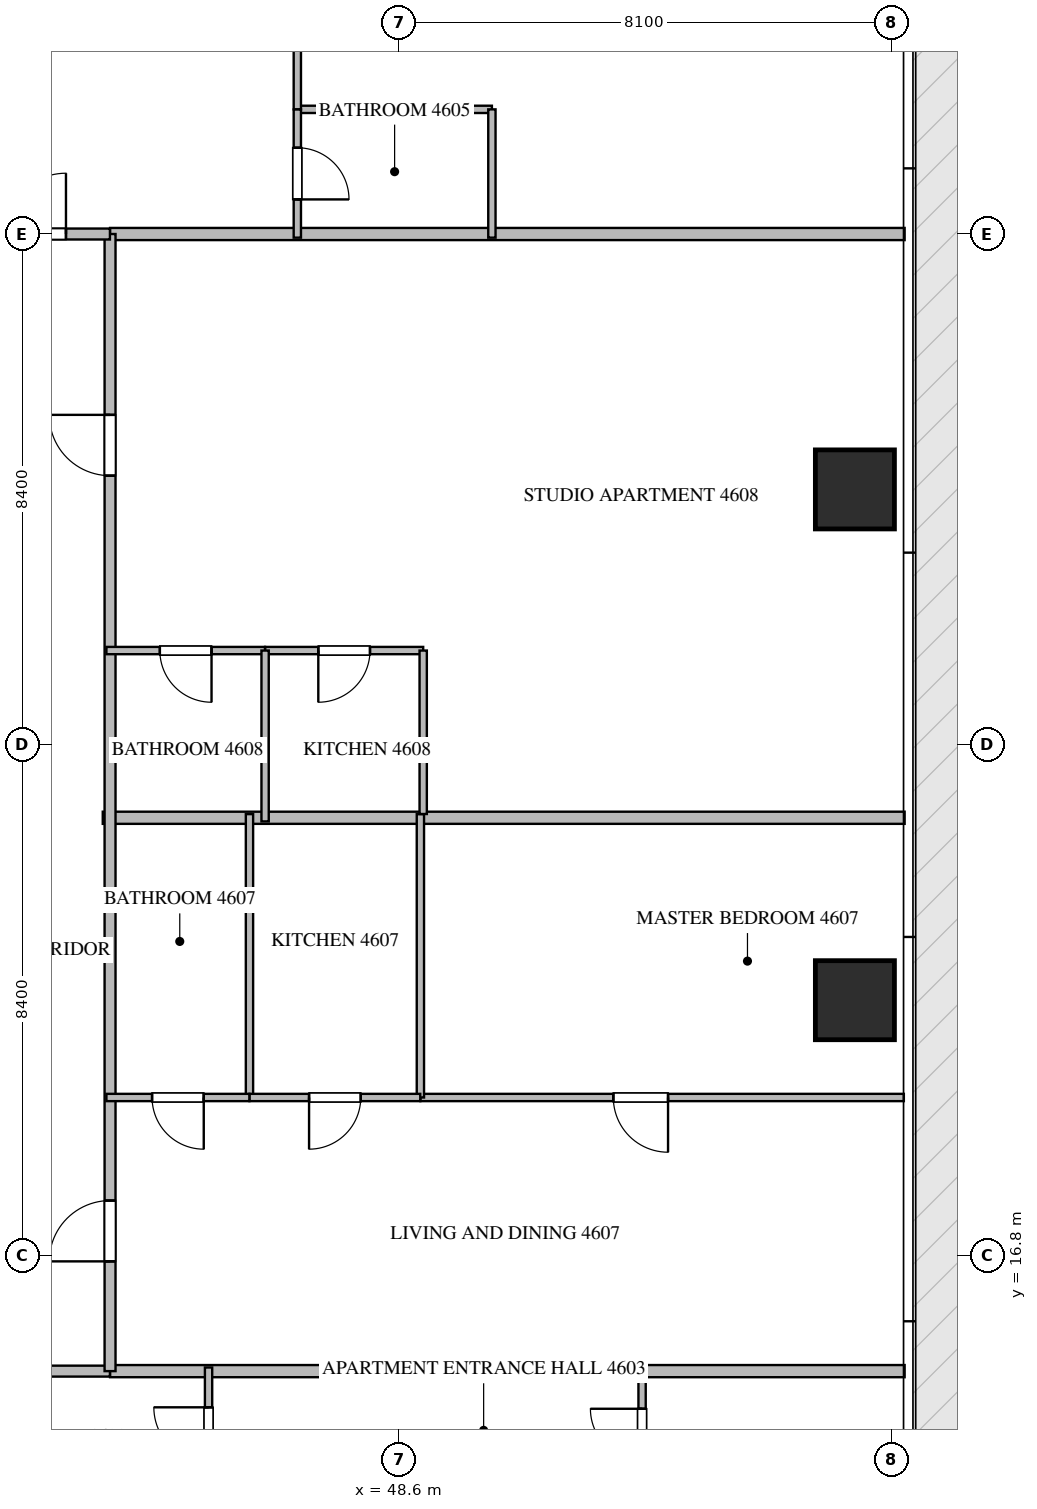
"""IFC4 building model, lengths in metres.
Left out: names, types, materials, properties, quantities, classifications, styles, units other than length and angle.
Written with IfcOpenShell. Run it as: python <this file> out.ifc"""

import sys

from ifc_helpers import new_model, si_unit, direction, frame, frame_2d, origin, origin_2d, place, context, subcontext, project, spatial, rectangle, extrude, source, transform, mapped, element, fill, save


model = new_model("IFC4")
c1 = context("Model", 3, precision=1e-05, world=origin(), true_north=direction((0.0, 1.0)))
c2 = subcontext(c1, "Body", "Model", "MODEL_VIEW")
j1 = project(units=[si_unit("LENGTHUNIT", "METRE"), si_unit("PLANEANGLEUNIT", "RADIAN")], contexts=[c1])
p1 = place(None, origin())
s1 = spatial("IfcSite", under=j1, at=p1, CompositionType="ELEMENT")
p2 = place(p1, origin())
s2 = spatial("IfcBuilding", under=s1, at=p2, CompositionType="ELEMENT")
p3 = place(p2, frame((0.0, 0.0, 183.9)))
s3 = spatial("IfcBuildingStorey", under=s2, at=p3, CompositionType="ELEMENT", Elevation=183.9)
m1 = source(origin(), c2, "Body", "SweptSolid", [
    extrude(rectangle(XDim=1.3, YDim=1.3, at=origin_2d()), origin(), (0.0, 0.0, 1.0), 3.75),
])
for number, where, z_axis, x_axis in (
    (1, (56.1, 21.0, -0.26), (0.0, 0.0, 1.0), (1.0, 0.0, 0.0)),
    (2, (56.1, 29.4, -0.26), (0.0, 0.0, 1.0), (1.0, 0.0, 0.0)),
):
    element("IfcColumn", number, at=place(p3, frame(where, z_axis=z_axis, x_axis=x_axis)), inside=s3, PredefinedType="COLUMN", context=c2, shape_type="MappedRepresentation", body=[
        mapped(m1, transform((0.0, 0.0, 0.0), scale=1.0)),
    ])
p4 = place(p3, frame((43.73, 24.0, 0.0), z_axis=(0.0, 0.0, 1.0), x_axis=(1.0, 0.0, 0.0)))
e3 = element("IfcWall", 3, at=p4, inside=s3, PredefinedType="PARTITIONING", context=c2, shape_type="SweptSolid", body=[
    extrude(rectangle(XDim=13.188, YDim=0.2, at=frame_2d((6.594, 0.0))), origin(), (0.0, 0.0, 1.0), 3.49),
])
for number, where, z_axis, x_axis in (
    (4, (43.85, 14.9, 0.0), (0.0, 0.0, 1.0), (1.0, 0.0, 0.0)),
    (5, (43.85, 33.6, 0.0), (0.0, 0.0, 1.0), (1.0, 0.0, 0.0)),
):
    element("IfcWall", number, at=place(p3, frame(where, z_axis=z_axis, x_axis=x_axis)), inside=s3, PredefinedType="PARTITIONING", context=c2, shape_type="SweptSolid", body=[
        extrude(rectangle(XDim=13.068, YDim=0.2, at=frame_2d((6.534, 0.0))), origin(), (0.0, 0.0, 1.0), 3.49),
    ])
p5 = place(p3, frame((20.952, 14.9, 0.0), z_axis=(0.0, 0.0, 1.0), x_axis=(1.0, 0.0, 0.0)))
e6 = element("IfcWall", 6, at=p5, inside=s3, PredefinedType="PARTITIONING", context=c2, shape_type="SweptSolid", body=[
    extrude(rectangle(XDim=22.896, YDim=0.18, at=frame_2d((11.448, 0.0))), origin(), (0.0, 0.0, 1.0), 3.49),
])
p6 = place(p5, frame((2.781, 0.0, 0.0)))
e7 = element("IfcOpeningElement", 7, at=p6, cuts=e6, PredefinedType="OPENING", context=c2, shape_type="SweptSolid", body=[
    extrude(rectangle(XDim=1.0, YDim=2.15, at=frame_2d((0.5, 1.075))), frame((0.0, 0.1, 0.0), z_axis=(0.0, -1.0, 0.0), x_axis=(1.0, 0.0, 0.0)), (0.0, 0.0, 1.0), 0.2),
])
p7 = place(p5, frame((14.736, 0.0, 0.0)))
e8 = element("IfcOpeningElement", 8, at=p7, cuts=e6, PredefinedType="OPENING", context=c2, shape_type="SweptSolid", body=[
    extrude(rectangle(XDim=1.0, YDim=2.15, at=frame_2d((0.5, 1.075))), frame((0.0, 0.1, 0.0), z_axis=(0.0, -1.0, 0.0), x_axis=(1.0, 0.0, 0.0)), (0.0, 0.0, 1.0), 0.2),
])
p8 = place(p5, frame((19.115, 0.0, 0.0)))
e9 = element("IfcOpeningElement", 9, at=p8, cuts=e6, PredefinedType="OPENING", context=c2, shape_type="SweptSolid", body=[
    extrude(rectangle(XDim=1.0, YDim=2.15, at=frame_2d((0.5, 1.075))), frame((0.0, 0.1, 0.0), z_axis=(0.0, -1.0, 0.0), x_axis=(1.0, 0.0, 0.0)), (0.0, 0.0, 1.0), 0.2),
])
p9 = place(p3, frame((43.85, 14.9, 0.0), z_axis=(0.0, 0.0, 1.0), x_axis=(0.0, 1.0, 0.0)))
e10 = element("IfcWall", 10, at=p9, inside=s3, PredefinedType="PARTITIONING", context=c2, shape_type="SweptSolid", body=[
    extrude(rectangle(XDim=18.7, YDim=0.18, at=frame_2d((9.35, 0.0))), origin(), (0.0, 0.0, 1.0), 3.49),
])
p10 = place(p9, frame((1.805, 0.0, 0.0)))
e11 = element("IfcOpeningElement", 11, at=p10, cuts=e10, PredefinedType="OPENING", context=c2, shape_type="SweptSolid", body=[
    extrude(rectangle(XDim=1.0, YDim=2.15, at=frame_2d((0.5, 1.075))), frame((0.0, 0.1, 0.0), z_axis=(0.0, -1.0, 0.0), x_axis=(1.0, 0.0, 0.0)), (0.0, 0.0, 1.0), 0.2),
])
p11 = place(p9, frame((14.726, 0.0, 0.0)))
e12 = element("IfcOpeningElement", 12, at=p11, cuts=e10, PredefinedType="OPENING", context=c2, shape_type="SweptSolid", body=[
    extrude(rectangle(XDim=1.0, YDim=2.15, at=frame_2d((0.5, 1.075))), frame((0.0, 0.1, 0.0), z_axis=(0.0, -1.0, 0.0), x_axis=(1.0, 0.0, 0.0)), (0.0, 0.0, 1.0), 0.2),
])
p12 = place(p3, frame((41.402, 33.6, 0.0), z_axis=(0.0, 0.0, 1.0), x_axis=(1.0, 0.0, 0.0)))
e13 = element("IfcWall", 13, at=p12, inside=s3, PredefinedType="PARTITIONING", context=c2, shape_type="SweptSolid", body=[
    extrude(rectangle(XDim=2.446, YDim=0.18, at=frame_2d((1.223, 0.0))), origin(), (0.0, 0.0, 1.0), 3.49),
])
p13 = place(p12, frame((0.723, 0.0, 0.0)))
e14 = element("IfcOpeningElement", 14, at=p13, cuts=e13, PredefinedType="OPENING", context=c2, shape_type="SweptSolid", body=[
    extrude(rectangle(XDim=1.0, YDim=2.15, at=frame_2d((0.5, 1.075))), frame((0.0, 0.1, 0.0), z_axis=(0.0, -1.0, 0.0), x_axis=(1.0, 0.0, 0.0)), (0.0, 0.0, 1.0), 0.2),
])
p14 = place(p3, frame((45.47, 12.75, 0.0), z_axis=(0.0, 0.0, 1.0), x_axis=(0.0, 1.0, 0.0)))
e15 = element("IfcWall", 15, at=p14, inside=s3, PredefinedType="PARTITIONING", context=c2, shape_type="SweptSolid", body=[
    extrude(rectangle(XDim=2.21, YDim=0.12, at=frame_2d((1.105, 0.0))), origin(), (0.0, 0.0, 1.0), 3.49),
])
p15 = place(p14, frame((0.655, 0.0, 0.0)))
e16 = element("IfcOpeningElement", 16, at=p15, cuts=e15, PredefinedType="OPENING", context=c2, shape_type="SweptSolid", body=[
    extrude(rectangle(XDim=0.9, YDim=2.1, at=frame_2d((0.45, 1.05))), frame((0.0, 0.07, 0.0), z_axis=(0.0, -1.0, 0.0), x_axis=(1.0, 0.0, 0.0)), (0.0, 0.0, 1.0), 0.14),
])
p16 = place(p3, frame((52.6, 12.752, 0.0), z_axis=(0.0, 0.0, 1.0), x_axis=(0.0, 1.0, 0.0)))
e17 = element("IfcWall", 17, at=p16, inside=s3, PredefinedType="PARTITIONING", context=c2, shape_type="SweptSolid", body=[
    extrude(rectangle(XDim=2.208, YDim=0.12, at=frame_2d((1.104, 0.0))), origin(), (0.0, 0.0, 1.0), 3.49),
])
p17 = place(p16, frame((0.679, 0.0, 0.0)))
e18 = element("IfcOpeningElement", 18, at=p17, cuts=e17, PredefinedType="OPENING", context=c2, shape_type="SweptSolid", body=[
    extrude(rectangle(XDim=0.85, YDim=2.1, at=frame_2d((0.425, 1.05))), frame((0.0, 0.07, 0.0), z_axis=(0.0, -1.0, 0.0), x_axis=(1.0, 0.0, 0.0)), (0.0, 0.0, 1.0), 0.14),
])
p18 = place(p3, frame((46.93, 35.65, 0.0), z_axis=(0.0, 0.0, 1.0), x_axis=(1.0, 0.0, 0.0)))
e19 = element("IfcWall", 19, at=p18, inside=s3, PredefinedType="PARTITIONING", context=c2, shape_type="SweptSolid", body=[
    extrude(rectangle(XDim=3.2, YDim=0.12, at=frame_2d((1.6, 0.0))), origin(), (0.0, 0.0, 1.0), 3.49),
])
p19 = place(p3, frame((50.13, 35.65, 0.0), z_axis=(0.0, 0.0, 1.0), x_axis=(0.0, -1.0, 0.0)))
e20 = element("IfcWall", 20, at=p19, inside=s3, PredefinedType="PARTITIONING", context=c2, shape_type="SweptSolid", body=[
    extrude(rectangle(XDim=2.11, YDim=0.12, at=frame_2d((1.055, 0.0))), origin(), (0.0, 0.0, 1.0), 3.49),
])
p20 = place(p3, frame((46.93, 41.073, 0.0), z_axis=(0.0, 0.0, 1.0), x_axis=(0.0, -1.0, 0.0)))
e21 = element("IfcWall", 21, at=p20, inside=s3, PredefinedType="PARTITIONING", context=c2, shape_type="SweptSolid", body=[
    extrude(rectangle(XDim=5.423, YDim=0.12, at=frame_2d((2.711, 0.0))), origin(), (0.0, 0.0, 1.0), 3.49),
])
p21 = place(p20, frame((2.287, 0.0, 0.0)))
e22 = element("IfcOpeningElement", 22, at=p21, cuts=e21, PredefinedType="OPENING", context=c2, shape_type="SweptSolid", body=[
    extrude(rectangle(XDim=0.85, YDim=2.1, at=frame_2d((0.425, 1.05))), frame((0.0, 0.07, 0.0), z_axis=(0.0, -1.0, 0.0), x_axis=(1.0, 0.0, 0.0)), (0.0, 0.0, 1.0), 0.14),
])
p22 = place(p3, frame((46.93, 35.648, 0.0), z_axis=(0.0, 0.0, 1.0), x_axis=(0.0, -1.0, 0.0)))
e23 = element("IfcWall", 23, at=p22, inside=s3, PredefinedType="PARTITIONING", context=c2, shape_type="SweptSolid", body=[
    extrude(rectangle(XDim=2.108, YDim=0.12, at=frame_2d((1.054, 0.0))), origin(), (0.0, 0.0, 1.0), 3.49),
])
p23 = place(p22, frame((0.629, 0.0, 0.0)))
e24 = element("IfcOpeningElement", 24, at=p23, cuts=e23, PredefinedType="OPENING", context=c2, shape_type="SweptSolid", body=[
    extrude(rectangle(XDim=0.85, YDim=2.1, at=frame_2d((0.425, 1.05))), frame((0.0, 0.07, 0.0), z_axis=(0.0, -1.0, 0.0), x_axis=(1.0, 0.0, 0.0)), (0.0, 0.0, 1.0), 0.14),
])
p24 = place(p3, frame((56.905, 19.4, 0.0), z_axis=(0.0, 0.0, 1.0), x_axis=(-1.0, 0.0, 0.0)))
e25 = element("IfcWall", 25, at=p24, inside=s3, PredefinedType="PARTITIONING", context=c2, shape_type="SweptSolid", body=[
    extrude(rectangle(XDim=7.951, YDim=0.12, at=frame_2d((3.976, 0.0))), origin(), (0.0, 0.0, 1.0), 3.49),
])
p25 = place(p24, frame((3.878, 0.0, 0.0)))
e26 = element("IfcOpeningElement", 26, at=p25, cuts=e25, PredefinedType="OPENING", context=c2, shape_type="SweptSolid", body=[
    extrude(rectangle(XDim=0.9, YDim=2.1, at=frame_2d((0.45, 1.05))), frame((0.0, 0.07, 0.0), z_axis=(0.0, -1.0, 0.0), x_axis=(1.0, 0.0, 0.0)), (0.0, 0.0, 1.0), 0.14),
])
for number, where, z_axis, x_axis in (
    (27, (48.954, 19.4, 0.0), (0.0, 0.0, 1.0), (0.0, 1.0, 0.0)),
    (28, (46.143, 19.4, 0.0), (0.0, 0.0, 1.0), (0.0, 1.0, 0.0)),
):
    element("IfcWall", number, at=place(p3, frame(where, z_axis=z_axis, x_axis=x_axis)), inside=s3, PredefinedType="PARTITIONING", context=c2, shape_type="SweptSolid", body=[
        extrude(rectangle(XDim=4.66, YDim=0.12, at=frame_2d((2.33, 0.0))), origin(), (0.0, 0.0, 1.0), 3.49),
    ])
p26 = place(p3, frame((48.952, 19.4, 0.0), z_axis=(0.0, 0.0, 1.0), x_axis=(-1.0, 0.0, 0.0)))
e29 = element("IfcWall", 29, at=p26, inside=s3, PredefinedType="PARTITIONING", context=c2, shape_type="SweptSolid", body=[
    extrude(rectangle(XDim=2.809, YDim=0.12, at=frame_2d((1.404, 0.0))), origin(), (0.0, 0.0, 1.0), 3.49),
])
p27 = place(p26, frame((0.979, 0.0, 0.0)))
e30 = element("IfcOpeningElement", 30, at=p27, cuts=e29, PredefinedType="OPENING", context=c2, shape_type="SweptSolid", body=[
    extrude(rectangle(XDim=0.85, YDim=2.1, at=frame_2d((0.425, 1.05))), frame((0.0, 0.07, 0.0), z_axis=(0.0, -1.0, 0.0), x_axis=(1.0, 0.0, 0.0)), (0.0, 0.0, 1.0), 0.14),
])
p28 = place(p3, frame((46.141, 19.4, 0.0), z_axis=(0.0, 0.0, 1.0), x_axis=(-1.0, 0.0, 0.0)))
e31 = element("IfcWall", 31, at=p28, inside=s3, PredefinedType="PARTITIONING", context=c2, shape_type="SweptSolid", body=[
    extrude(rectangle(XDim=2.351, YDim=0.12, at=frame_2d((1.176, 0.0))), origin(), (0.0, 0.0, 1.0), 3.49),
])
p29 = place(p28, frame((0.75, 0.0, 0.0)))
e32 = element("IfcOpeningElement", 32, at=p29, cuts=e31, PredefinedType="OPENING", context=c2, shape_type="SweptSolid", body=[
    extrude(rectangle(XDim=0.85, YDim=2.1, at=frame_2d((0.425, 1.05))), frame((0.0, 0.07, 0.0), z_axis=(0.0, -1.0, 0.0), x_axis=(1.0, 0.0, 0.0)), (0.0, 0.0, 1.0), 0.14),
])
p30 = place(p3, frame((49.0, 26.75, 0.0), z_axis=(0.0, 0.0, 1.0), x_axis=(-1.0, 0.0, 0.0)))
e33 = element("IfcWall", 33, at=p30, inside=s3, PredefinedType="PARTITIONING", context=c2, shape_type="SweptSolid", body=[
    extrude(rectangle(XDim=2.6, YDim=0.12, at=frame_2d((1.3, 0.0))), origin(), (0.0, 0.0, 1.0), 3.49),
])
p31 = place(p30, frame((0.875, 0.0, 0.0)))
e34 = element("IfcOpeningElement", 34, at=p31, cuts=e33, PredefinedType="OPENING", context=c2, shape_type="SweptSolid", body=[
    extrude(rectangle(XDim=0.85, YDim=2.1, at=frame_2d((0.425, 1.05))), frame((0.0, 0.07, 0.0), z_axis=(0.0, -1.0, 0.0), x_axis=(1.0, 0.0, 0.0)), (0.0, 0.0, 1.0), 0.14),
])
p32 = place(p3, frame((46.398, 26.75, 0.0), z_axis=(0.0, 0.0, 1.0), x_axis=(-1.0, 0.0, 0.0)))
e35 = element("IfcWall", 35, at=p32, inside=s3, PredefinedType="PARTITIONING", context=c2, shape_type="SweptSolid", body=[
    extrude(rectangle(XDim=2.608, YDim=0.12, at=frame_2d((1.304, 0.0))), origin(), (0.0, 0.0, 1.0), 3.49),
])
p33 = place(p32, frame((0.879, 0.0, 0.0)))
e36 = element("IfcOpeningElement", 36, at=p33, cuts=e35, PredefinedType="OPENING", context=c2, shape_type="SweptSolid", body=[
    extrude(rectangle(XDim=0.85, YDim=2.1, at=frame_2d((0.425, 1.05))), frame((0.0, 0.07, 0.0), z_axis=(0.0, -1.0, 0.0), x_axis=(1.0, 0.0, 0.0)), (0.0, 0.0, 1.0), 0.14),
])
p34 = place(p3, frame((46.4, 23.94, 0.0), z_axis=(0.0, 0.0, 1.0), x_axis=(0.0, 1.0, 0.0)))
e37 = element("IfcWall", 37, at=p34, inside=s3, PredefinedType="PARTITIONING", context=c2, shape_type="SweptSolid", body=[
    extrude(rectangle(XDim=2.81, YDim=0.12, at=frame_2d((1.405, 0.0))), origin(), (0.0, 0.0, 1.0), 3.49),
])
p35 = place(p3, frame((49.0, 24.062, 0.0), z_axis=(0.0, 0.0, 1.0), x_axis=(0.0, 1.0, 0.0)))
e38 = element("IfcWall", 38, at=p35, inside=s3, PredefinedType="PARTITIONING", context=c2, shape_type="SweptSolid", body=[
    extrude(rectangle(XDim=2.688, YDim=0.12, at=frame_2d((1.344, 0.0))), origin(), (0.0, 0.0, 1.0), 3.49),
])
m2 = source(origin(), c2, "Body", "SweptSolid", [
    extrude(rectangle(XDim=1.0, YDim=2.15, at=frame_2d((0.5, 1.075))), frame((0.0, 0.025, 0.0), z_axis=(0.0, -1.0, 0.0), x_axis=(1.0, 0.0, 0.0)), (0.0, 0.0, 1.0), 0.05),
])
p36 = place(p10, origin())
e39 = element("IfcDoor", 39, at=p36, inside=s3, OperationType="SINGLE_SWING_LEFT", PredefinedType="DOOR", context=c2, shape_type="MappedRepresentation", body=[
    mapped(m2, transform((0.0, 0.0, 0.0), scale=1.0)),
])
fill(e11, e39)
p37 = place(p11, origin())
e40 = element("IfcDoor", 40, at=p37, inside=s3, OperationType="SINGLE_SWING_RIGHT", PredefinedType="DOOR", context=c2, shape_type="MappedRepresentation", body=[
    mapped(m2, transform((0.0, 0.0, 0.0), scale=1.0)),
])
fill(e12, e40)
p38 = place(p13, origin())
e41 = element("IfcDoor", 41, at=p38, inside=s3, OperationType="SINGLE_SWING_RIGHT", PredefinedType="DOOR", context=c2, shape_type="MappedRepresentation", body=[
    mapped(m2, transform((0.0, 0.0, 0.0), scale=1.0)),
])
fill(e14, e41)
m3 = source(origin(), c2, "Body", "SweptSolid", [
    extrude(rectangle(XDim=0.9, YDim=2.1, at=frame_2d((0.45, 1.05))), frame((0.0, 0.025, 0.0), z_axis=(0.0, -1.0, 0.0), x_axis=(1.0, 0.0, 0.0)), (0.0, 0.0, 1.0), 0.05),
])
p39 = place(p15, origin())
e42 = element("IfcDoor", 42, at=p39, inside=s3, OperationType="SINGLE_SWING_RIGHT", PredefinedType="DOOR", context=c2, shape_type="MappedRepresentation", body=[
    mapped(m3, transform((0.0, 0.0, 0.0), scale=1.0)),
])
fill(e16, e42)
m4 = source(origin(), c2, "Body", "SweptSolid", [
    extrude(rectangle(XDim=0.85, YDim=2.1, at=frame_2d((0.425, 1.05))), frame((0.0, 0.025, 0.0), z_axis=(0.0, -1.0, 0.0), x_axis=(1.0, 0.0, 0.0)), (0.0, 0.0, 1.0), 0.05),
])
p40 = place(p17, origin())
e43 = element("IfcDoor", 43, at=p40, inside=s3, OperationType="SINGLE_SWING_RIGHT", PredefinedType="DOOR", context=c2, shape_type="MappedRepresentation", body=[
    mapped(m4, transform((0.0, 0.0, 0.0), scale=1.0)),
])
fill(e18, e43)
p41 = place(p23, origin())
e44 = element("IfcDoor", 44, at=p41, inside=s3, OperationType="SINGLE_SWING_RIGHT", PredefinedType="DOOR", context=c2, shape_type="MappedRepresentation", body=[
    mapped(m4, transform((0.0, 0.0, 0.0), scale=1.0)),
])
fill(e24, e44)
p42 = place(p25, origin())
e45 = element("IfcDoor", 45, at=p42, inside=s3, OperationType="SINGLE_SWING_LEFT", PredefinedType="DOOR", context=c2, shape_type="MappedRepresentation", body=[
    mapped(m3, transform((0.0, 0.0, 0.0), scale=1.0)),
])
fill(e26, e45)
p43 = place(p27, origin())
e46 = element("IfcDoor", 46, at=p43, inside=s3, OperationType="SINGLE_SWING_RIGHT", PredefinedType="DOOR", context=c2, shape_type="MappedRepresentation", body=[
    mapped(m4, transform((0.0, 0.0, 0.0), scale=1.0)),
])
fill(e30, e46)
p44 = place(p29, origin())
e47 = element("IfcDoor", 47, at=p44, inside=s3, OperationType="SINGLE_SWING_LEFT", PredefinedType="DOOR", context=c2, shape_type="MappedRepresentation", body=[
    mapped(m4, transform((0.0, 0.0, 0.0), scale=1.0)),
])
fill(e32, e47)
p45 = place(p31, origin())
e48 = element("IfcDoor", 48, at=p45, inside=s3, OperationType="SINGLE_SWING_RIGHT", PredefinedType="DOOR", context=c2, shape_type="MappedRepresentation", body=[
    mapped(m4, transform((0.0, 0.0, 0.0), scale=1.0)),
])
fill(e34, e48)
p46 = place(p33, origin())
e49 = element("IfcDoor", 49, at=p46, inside=s3, OperationType="SINGLE_SWING_LEFT", PredefinedType="DOOR", context=c2, shape_type="MappedRepresentation", body=[
    mapped(m4, transform((0.0, 0.0, 0.0), scale=1.0)),
])
fill(e36, e49)
save(model, sys.argv[1])
